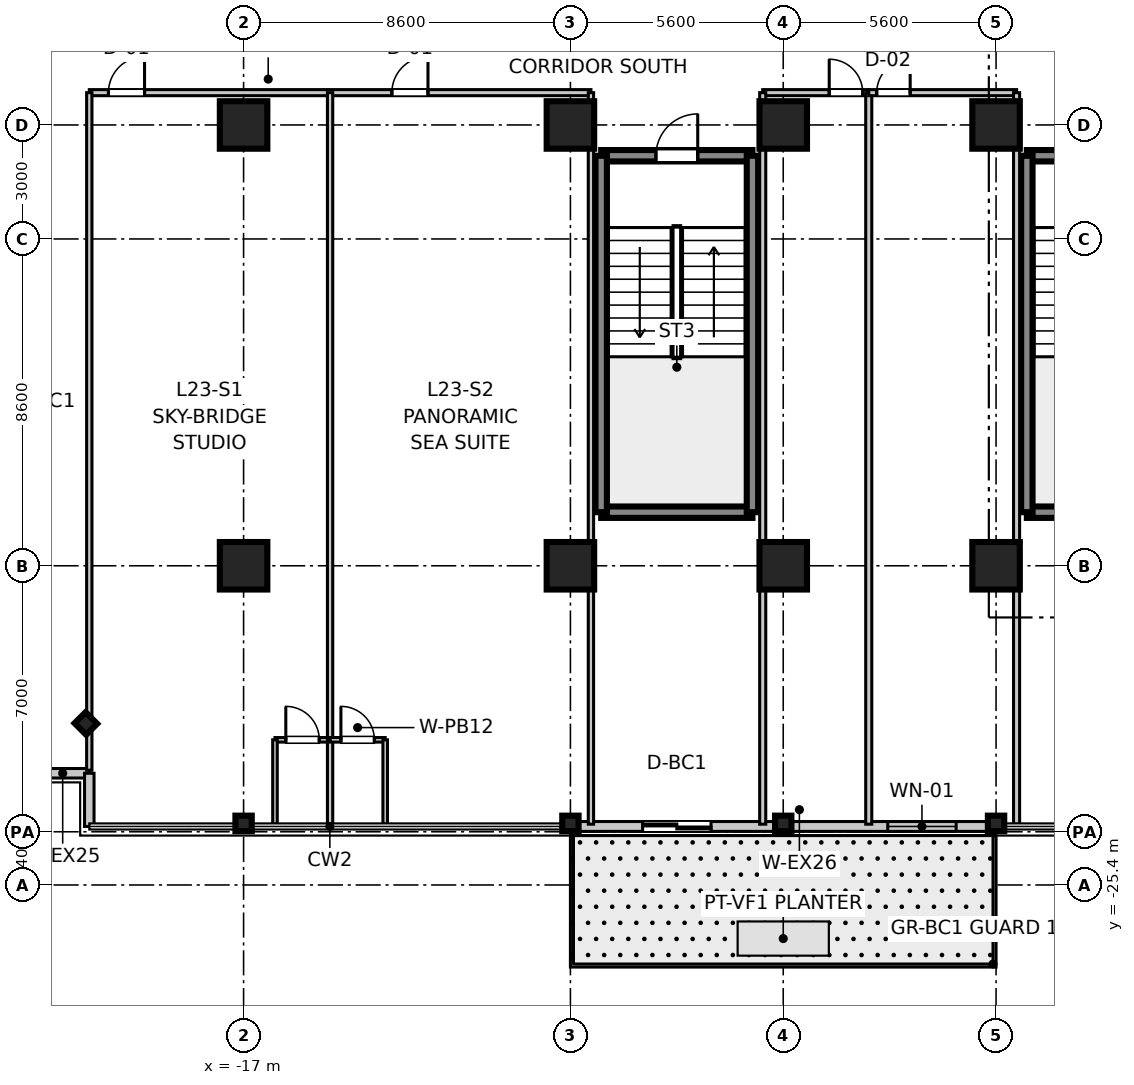
"""IFC4 building model, lengths in metres.
Left out: names, types, materials, properties, quantities, classifications, styles, units other than length and angle.
Written with IfcOpenShell. Run it as: python <this file> out.ifc"""

import sys

from ifc_helpers import new_model, si_unit, direction, frame, frame_2d, origin, origin_2d, place, context, subcontext, project, spatial, rectangle, i_section, extrude, source, transform, mapped, element, fill, save


model = new_model("IFC4")
c1 = context("Model", 3, precision=1e-05, world=origin(), true_north=direction((0.0, 1.0)))
c2 = subcontext(c1, "Body", "Model", "MODEL_VIEW")
j1 = project(units=[si_unit("LENGTHUNIT", "METRE"), si_unit("PLANEANGLEUNIT", "RADIAN")], contexts=[c1])
p1 = place(None, origin())
s1 = spatial("IfcSite", under=j1, at=p1, CompositionType="ELEMENT")
p2 = place(p1, origin())
s2 = spatial("IfcBuilding", under=s1, at=p2, CompositionType="ELEMENT")
p3 = place(p2, frame((0.0, 0.0, 95.6)))
s3 = spatial("IfcBuildingStorey", under=s2, at=p3, CompositionType="ELEMENT", Elevation=95.6)
m1 = source(origin(), c2, "Body", "SweptSolid", [
    extrude(rectangle(XDim=1.25, YDim=1.25, at=origin_2d()), origin(), (0.0, 0.0, 1.0), 3.605),
])
for number, where, z_axis, x_axis in (
    (1, (-17.0, -17.0, 0.0), (0.0, 0.0, 1.0), (1.0, 0.0, 0.0)),
    (2, (-17.0, -5.4, 0.0), (0.0, 0.0, 1.0), (1.0, 0.0, 0.0)),
    (3, (-8.4, -17.0, 0.0), (0.0, 0.0, 1.0), (1.0, 0.0, 0.0)),
    (4, (-8.4, -5.4, 0.0), (0.0, 0.0, 1.0), (1.0, 0.0, 0.0)),
    (5, (-2.8, -17.0, 0.0), (0.0, 0.0, 1.0), (1.0, 0.0, 0.0)),
    (6, (-2.8, -5.4, 0.0), (0.0, 0.0, 1.0), (1.0, 0.0, 0.0)),
    (7, (2.8, -17.0, 0.0), (0.0, 0.0, 1.0), (1.0, 0.0, 0.0)),
    (8, (2.8, -5.4, 0.0), (0.0, 0.0, 1.0), (1.0, 0.0, 0.0)),
):
    element("IfcColumn", number, at=place(p3, frame(where, z_axis=z_axis, x_axis=x_axis)), inside=s3, PredefinedType="COLUMN", context=c2, shape_type="MappedRepresentation", body=[
        mapped(m1, transform((0.0, 0.0, 0.0), scale=1.0)),
    ])
m2 = source(origin(), c2, "Body", "SweptSolid", [
    extrude(i_section(OverallWidth=0.409, OverallDepth=0.43, WebThickness=0.021, FlangeThickness=0.034, at=origin_2d()), origin(), (0.0, 0.0, 1.0), 3.605),
])
for number, where, z_axis, x_axis in (
    (9, (-17.0, -23.78, 0.0), (0.0, 0.0, 1.0), (0.0, 1.0, 0.0)),
    (10, (-8.4, -23.78, 0.0), (0.0, 0.0, 1.0), (0.0, 1.0, 0.0)),
    (11, (-2.8, -23.78, 0.0), (0.0, 0.0, 1.0), (0.0, 1.0, 0.0)),
    (12, (2.8, -23.78, 0.0), (0.0, 0.0, 1.0), (0.0, 1.0, 0.0)),
    (13, (-21.15, -21.15, 0.0), (0.0, 0.0, 1.0), (0.707, 0.707, 0.0)),
):
    element("IfcColumn", number, at=place(p3, frame(where, z_axis=z_axis, x_axis=x_axis)), inside=s3, PredefinedType="COLUMN", context=c2, shape_type="MappedRepresentation", body=[
        mapped(m2, transform((0.0, 0.0, 0.0), scale=1.0)),
    ])
m3 = source(origin(), c2, "Body", "SweptSolid", [
    extrude(rectangle(XDim=3.98, YDim=0.3, at=frame_2d((1.99, 0.0))), origin(), (0.0, 0.0, 1.0), 3.38),
])
for number, where, z_axis, x_axis in (
    (14, (3.61, -15.59, 0.0), (0.0, 0.0, 1.0), (1.0, 0.0, 0.0)),
    (15, (3.61, -6.21, 0.0), (0.0, 0.0, 1.0), (1.0, 0.0, 0.0)),
):
    element("IfcWall", number, at=place(p3, frame(where, z_axis=z_axis, x_axis=x_axis)), inside=s3, PredefinedType="SHEAR", context=c2, shape_type="MappedRepresentation", body=[
        mapped(m3, transform((0.0, 0.0, 0.0), scale=1.0)),
    ])
m4 = source(origin(), c2, "Body", "SweptSolid", [
    extrude(rectangle(XDim=9.38, YDim=0.3, at=frame_2d((4.69, 0.0))), origin(), (0.0, 0.0, 1.0), 3.38),
])
p4 = place(p3, frame((3.61, -15.59, 0.0), z_axis=(0.0, 0.0, 1.0), x_axis=(0.0, 1.0, 0.0)))
e16 = element("IfcWall", 16, at=p4, inside=s3, PredefinedType="SHEAR", context=c2, shape_type="MappedRepresentation", body=[
    mapped(m4, transform((0.0, 0.0, 0.0), scale=1.0)),
])
p5 = place(p3, frame((-7.59, -15.59, 0.0), z_axis=(0.0, 0.0, 1.0), x_axis=(1.0, 0.0, 0.0)))
e17 = element("IfcWall", 17, at=p5, inside=s3, PredefinedType="SHEAR", context=c2, shape_type="MappedRepresentation", body=[
    mapped(m3, transform((0.0, 0.0, 0.0), scale=1.0)),
])
p6 = place(p3, frame((-7.59, -6.21, 0.0), z_axis=(0.0, 0.0, 1.0), x_axis=(1.0, 0.0, 0.0)))
e18 = element("IfcWall", 18, at=p6, inside=s3, PredefinedType="SHEAR", context=c2, shape_type="MappedRepresentation", body=[
    mapped(m3, transform((0.0, 0.0, 0.0), scale=1.0)),
])
p7 = place(p6, frame((1.44, 0.0, 0.0)))
e19 = element("IfcOpeningElement", 19, at=p7, cuts=e18, PredefinedType="OPENING", context=c2, shape_type="SweptSolid", body=[
    extrude(rectangle(XDim=1.1, YDim=2.15, at=frame_2d((0.55, 1.075))), frame((0.0, 0.16, 0.0), z_axis=(0.0, -1.0, 0.0), x_axis=(1.0, 0.0, 0.0)), (0.0, 0.0, 1.0), 0.32),
])
for number, where, z_axis, x_axis in (
    (20, (-7.59, -15.59, 0.0), (0.0, 0.0, 1.0), (0.0, 1.0, 0.0)),
    (21, (-3.61, -15.59, 0.0), (0.0, 0.0, 1.0), (0.0, 1.0, 0.0)),
):
    element("IfcWall", number, at=place(p3, frame(where, z_axis=z_axis, x_axis=x_axis)), inside=s3, PredefinedType="SHEAR", context=c2, shape_type="MappedRepresentation", body=[
        mapped(m4, transform((0.0, 0.0, 0.0), scale=1.0)),
    ])
m5 = source(origin(), c2, "Body", "SweptSolid", [
    extrude(rectangle(XDim=1.4, YDim=0.25, at=frame_2d((0.7, 0.0))), origin(), (0.0, 0.0, 1.0), 3.38),
])
p8 = place(p3, frame((-22.46, -22.46, 0.0), z_axis=(0.0, 0.0, 1.0), x_axis=(1.0, 0.0, 0.0)))
e22 = element("IfcWall", 22, at=p8, inside=s3, PredefinedType="STANDARD", context=c2, shape_type="MappedRepresentation", body=[
    mapped(m5, transform((0.0, 0.0, 0.0), scale=1.0)),
])
m6 = source(origin(), c2, "Body", "SweptSolid", [
    extrude(rectangle(XDim=1.4, YDim=0.25, at=frame_2d((0.7, 0.0))), origin(), (0.0, 0.0, 1.0), 3.38),
])
p9 = place(p3, frame((-21.06, -23.86, 0.0), z_axis=(0.0, 0.0, 1.0), x_axis=(0.0, 1.0, 0.0)))
e23 = element("IfcWall", 23, at=p9, inside=s3, PredefinedType="STANDARD", context=c2, shape_type="MappedRepresentation", body=[
    mapped(m6, transform((0.0, 0.0, 0.0), scale=1.0)),
])
m7 = source(origin(), c2, "Body", "SweptSolid", [
    extrude(rectangle(XDim=11.2, YDim=0.26, at=frame_2d((5.6, 0.0))), origin(), (0.0, 0.0, 1.0), 2.86),
])
p10 = place(p3, frame((-8.4, -23.86, 0.0), z_axis=(0.0, 0.0, 1.0), x_axis=(1.0, 0.0, 0.0)))
e24 = element("IfcWall", 24, at=p10, inside=s3, PredefinedType="STANDARD", context=c2, shape_type="MappedRepresentation", body=[
    mapped(m7, transform((0.0, 0.0, 0.0), scale=1.0)),
])
p11 = place(p10, frame((1.9, 0.0, 0.0)))
e25 = element("IfcOpeningElement", 25, at=p11, cuts=e24, PredefinedType="OPENING", context=c2, shape_type="SweptSolid", body=[
    extrude(rectangle(XDim=1.8, YDim=2.25, at=frame_2d((0.9, 1.125))), frame((0.0, 0.14, 0.0), z_axis=(0.0, -1.0, 0.0), x_axis=(1.0, 0.0, 0.0)), (0.0, 0.0, 1.0), 0.28),
])
p12 = place(p10, frame((8.35, 0.0, 0.85)))
e26 = element("IfcOpeningElement", 26, at=p12, cuts=e24, PredefinedType="OPENING", context=c2, shape_type="SweptSolid", body=[
    extrude(rectangle(XDim=1.8, YDim=1.5, at=frame_2d((0.9, 0.75))), frame((0.0, 0.14, 0.0), z_axis=(0.0, -1.0, 0.0), x_axis=(1.0, 0.0, 0.0)), (0.0, 0.0, 1.0), 0.28),
])
m8 = source(origin(), c2, "Body", "SweptSolid", [
    extrude(rectangle(XDim=13.2, YDim=0.16, at=frame_2d((6.6, 0.0))), origin(), (0.0, 0.0, 1.0), 2.72),
])
p13 = place(p3, frame((-21.06, -4.55, 0.0), z_axis=(0.0, 0.0, 1.0), x_axis=(1.0, 0.0, 0.0)))
e27 = element("IfcWall", 27, at=p13, inside=s3, PredefinedType="PARTITIONING", context=c2, shape_type="MappedRepresentation", body=[
    mapped(m8, transform((0.0, 0.0, 0.0), scale=1.0)),
])
p14 = place(p13, frame((0.504, 0.0, 0.0)))
e28 = element("IfcOpeningElement", 28, at=p14, cuts=e27, PredefinedType="OPENING", context=c2, shape_type="SweptSolid", body=[
    extrude(rectangle(XDim=0.95, YDim=2.1, at=frame_2d((0.475, 1.05))), frame((0.0, 0.09, 0.0), z_axis=(0.0, -1.0, 0.0), x_axis=(1.0, 0.0, 0.0)), (0.0, 0.0, 1.0), 0.18),
])
p15 = place(p13, frame((7.962, 0.0, 0.0)))
e29 = element("IfcOpeningElement", 29, at=p15, cuts=e27, PredefinedType="OPENING", context=c2, shape_type="SweptSolid", body=[
    extrude(rectangle(XDim=0.95, YDim=2.1, at=frame_2d((0.475, 1.05))), frame((0.0, 0.09, 0.0), z_axis=(0.0, -1.0, 0.0), x_axis=(1.0, 0.0, 0.0)), (0.0, 0.0, 1.0), 0.18),
])
m9 = source(origin(), c2, "Body", "SweptSolid", [
    extrude(rectangle(XDim=17.83, YDim=0.14, at=frame_2d((8.915, 0.0))), origin(), (0.0, 0.0, 1.0), 2.72),
])
p16 = place(p3, frame((-21.06, -22.38, 0.0), z_axis=(0.0, 0.0, 1.0), x_axis=(0.0, 1.0, 0.0)))
e30 = element("IfcWall", 30, at=p16, inside=s3, PredefinedType="PARTITIONING", context=c2, shape_type="MappedRepresentation", body=[
    mapped(m9, transform((0.0, 0.0, 0.0), scale=1.0)),
])
m10 = source(origin(), c2, "Body", "SweptSolid", [
    extrude(rectangle(XDim=19.25, YDim=0.14, at=frame_2d((9.625, 0.0))), origin(), (0.0, 0.0, 1.0), 2.72),
])
p17 = place(p3, frame((-7.86, -23.8, 0.0), z_axis=(0.0, 0.0, 1.0), x_axis=(0.0, 1.0, 0.0)))
e31 = element("IfcWall", 31, at=p17, inside=s3, PredefinedType="PARTITIONING", context=c2, shape_type="MappedRepresentation", body=[
    mapped(m10, transform((0.0, 0.0, 0.0), scale=1.0)),
])
m11 = source(origin(), c2, "Body", "SweptSolid", [
    extrude(rectangle(XDim=1.45, YDim=0.12, at=frame_2d((0.725, 0.0))), origin(), (0.0, 0.0, 1.0), 2.72),
])
p18 = place(p3, frame((-16.174, -21.58, 0.0), z_axis=(0.0, 0.0, 1.0), x_axis=(1.0, 0.0, 0.0)))
e32 = element("IfcWall", 32, at=p18, inside=s3, PredefinedType="PARTITIONING", context=c2, shape_type="MappedRepresentation", body=[
    mapped(m11, transform((0.0, 0.0, 0.0), scale=1.0)),
])
p19 = place(p18, frame((0.285, 0.0, 0.0)))
e33 = element("IfcOpeningElement", 33, at=p19, cuts=e32, PredefinedType="OPENING", context=c2, shape_type="SweptSolid", body=[
    extrude(rectangle(XDim=0.88, YDim=2.1, at=frame_2d((0.44, 1.05))), frame((0.0, 0.07, 0.0), z_axis=(0.0, -1.0, 0.0), x_axis=(1.0, 0.0, 0.0)), (0.0, 0.0, 1.0), 0.14),
])
m12 = source(origin(), c2, "Body", "SweptSolid", [
    extrude(rectangle(XDim=2.22, YDim=0.12, at=frame_2d((1.11, 0.0))), origin(), (0.0, 0.0, 1.0), 2.72),
])
p20 = place(p3, frame((-16.174, -23.8, 0.0), z_axis=(0.0, 0.0, 1.0), x_axis=(0.0, 1.0, 0.0)))
e34 = element("IfcWall", 34, at=p20, inside=s3, PredefinedType="PARTITIONING", context=c2, shape_type="MappedRepresentation", body=[
    mapped(m12, transform((0.0, 0.0, 0.0), scale=1.0)),
])
p21 = place(p3, frame((-14.724, -23.8, 0.0), z_axis=(0.0, 0.0, 1.0), x_axis=(0.0, 1.0, 0.0)))
e35 = element("IfcWall", 35, at=p21, inside=s3, PredefinedType="PARTITIONING", context=c2, shape_type="MappedRepresentation", body=[
    mapped(m10, transform((0.0, 0.0, 0.0), scale=1.0)),
])
m13 = source(origin(), c2, "Body", "SweptSolid", [
    extrude(rectangle(XDim=1.45, YDim=0.12, at=frame_2d((0.725, 0.0))), origin(), (0.0, 0.0, 1.0), 2.72),
])
p22 = place(p3, frame((-14.724, -21.58, 0.0), z_axis=(0.0, 0.0, 1.0), x_axis=(1.0, 0.0, 0.0)))
e36 = element("IfcWall", 36, at=p22, inside=s3, PredefinedType="PARTITIONING", context=c2, shape_type="MappedRepresentation", body=[
    mapped(m13, transform((0.0, 0.0, 0.0), scale=1.0)),
])
p23 = place(p22, frame((0.285, 0.0, 0.0)))
e37 = element("IfcOpeningElement", 37, at=p23, cuts=e36, PredefinedType="OPENING", context=c2, shape_type="SweptSolid", body=[
    extrude(rectangle(XDim=0.88, YDim=2.1, at=frame_2d((0.44, 1.05))), frame((0.0, 0.07, 0.0), z_axis=(0.0, -1.0, 0.0), x_axis=(1.0, 0.0, 0.0)), (0.0, 0.0, 1.0), 0.14),
])
p24 = place(p3, frame((-13.274, -23.8, 0.0), z_axis=(0.0, 0.0, 1.0), x_axis=(0.0, 1.0, 0.0)))
e38 = element("IfcWall", 38, at=p24, inside=s3, PredefinedType="PARTITIONING", context=c2, shape_type="MappedRepresentation", body=[
    mapped(m12, transform((0.0, 0.0, 0.0), scale=1.0)),
])
m14 = source(origin(), c2, "Body", "SweptSolid", [
    extrude(rectangle(XDim=2.79, YDim=0.16, at=frame_2d((1.395, 0.0))), origin(), (0.0, 0.0, 1.0), 2.72),
])
p25 = place(p3, frame((-3.34, -4.55, 0.0), z_axis=(0.0, 0.0, 1.0), x_axis=(1.0, 0.0, 0.0)))
e39 = element("IfcWall", 39, at=p25, inside=s3, PredefinedType="PARTITIONING", context=c2, shape_type="MappedRepresentation", body=[
    mapped(m14, transform((0.0, 0.0, 0.0), scale=1.0)),
])
p26 = place(p25, frame((1.75, 0.0, 0.0)))
e40 = element("IfcOpeningElement", 40, at=p26, cuts=e39, PredefinedType="OPENING", context=c2, shape_type="SweptSolid", body=[
    extrude(rectangle(XDim=0.88, YDim=2.1, at=frame_2d((0.44, 1.05))), frame((0.0, 0.09, 0.0), z_axis=(0.0, -1.0, 0.0), x_axis=(1.0, 0.0, 0.0)), (0.0, 0.0, 1.0), 0.18),
])
m15 = source(origin(), c2, "Body", "SweptSolid", [
    extrude(rectangle(XDim=19.25, YDim=0.16, at=frame_2d((9.625, 0.0))), origin(), (0.0, 0.0, 1.0), 2.72),
])
for number, where, z_axis, x_axis in (
    (41, (-3.34, -23.8, 0.0), (0.0, 0.0, 1.0), (0.0, 1.0, 0.0)),
    (42, (-0.55, -23.8, 0.0), (0.0, 0.0, 1.0), (0.0, 1.0, 0.0)),
):
    element("IfcWall", number, at=place(p3, frame(where, z_axis=z_axis, x_axis=x_axis)), inside=s3, PredefinedType="PARTITIONING", context=c2, shape_type="MappedRepresentation", body=[
        mapped(m15, transform((0.0, 0.0, 0.0), scale=1.0)),
    ])
m16 = source(origin(), c2, "Body", "SweptSolid", [
    extrude(rectangle(XDim=3.89, YDim=0.16, at=frame_2d((1.945, 0.0))), origin(), (0.0, 0.0, 1.0), 2.72),
])
p27 = place(p3, frame((-0.55, -4.55, 0.0), z_axis=(0.0, 0.0, 1.0), x_axis=(1.0, 0.0, 0.0)))
e43 = element("IfcWall", 43, at=p27, inside=s3, PredefinedType="PARTITIONING", context=c2, shape_type="MappedRepresentation", body=[
    mapped(m16, transform((0.0, 0.0, 0.0), scale=1.0)),
])
p28 = place(p27, frame((0.21, 0.0, 0.0)))
e44 = element("IfcOpeningElement", 44, at=p28, cuts=e43, PredefinedType="OPENING", context=c2, shape_type="SweptSolid", body=[
    extrude(rectangle(XDim=0.88, YDim=2.1, at=frame_2d((0.44, 1.05))), frame((0.0, 0.09, 0.0), z_axis=(0.0, -1.0, 0.0), x_axis=(1.0, 0.0, 0.0)), (0.0, 0.0, 1.0), 0.18),
])
p29 = place(p3, frame((3.34, -23.8, 0.0), z_axis=(0.0, 0.0, 1.0), x_axis=(0.0, 1.0, 0.0)))
e45 = element("IfcWall", 45, at=p29, inside=s3, PredefinedType="PARTITIONING", context=c2, shape_type="MappedRepresentation", body=[
    mapped(m15, transform((0.0, 0.0, 0.0), scale=1.0)),
])
m17 = source(origin(), c2, "Body", "SweptSolid", [
    extrude(rectangle(XDim=1.1, YDim=2.15, at=frame_2d((0.55, 1.075))), frame((0.0, 0.025, 0.0), z_axis=(0.0, -1.0, 0.0), x_axis=(1.0, 0.0, 0.0)), (0.0, 0.0, 1.0), 0.05),
])
p30 = place(p7, frame((1.1, 0.0, 0.0), z_axis=(0.0, 0.0, 1.0), x_axis=(-1.0, 0.0, 0.0)))
e46 = element("IfcDoor", 46, at=p30, inside=s3, OperationType="SINGLE_SWING_RIGHT", PredefinedType="DOOR", context=c2, shape_type="MappedRepresentation", body=[
    mapped(m17, transform((0.0, 0.0, 0.0), scale=1.0)),
])
fill(e19, e46)
m18 = source(origin(), c2, "Body", "SweptSolid", [
    extrude(rectangle(XDim=0.88, YDim=2.1, at=frame_2d((0.44, 1.05))), frame((0.0, 0.025, 0.0), z_axis=(0.0, -1.0, 0.0), x_axis=(1.0, 0.0, 0.0)), (0.0, 0.0, 1.0), 0.05),
])
p31 = place(p19, frame((0.88, 0.0, 0.0), z_axis=(0.0, 0.0, 1.0), x_axis=(-1.0, 0.0, 0.0)))
e47 = element("IfcDoor", 47, at=p31, inside=s3, OperationType="SINGLE_SWING_LEFT", PredefinedType="DOOR", context=c2, shape_type="MappedRepresentation", body=[
    mapped(m18, transform((0.0, 0.0, 0.0), scale=1.0)),
])
fill(e33, e47)
m19 = source(origin(), c2, "Body", "SweptSolid", [
    extrude(rectangle(XDim=0.95, YDim=2.1, at=frame_2d((0.475, 1.05))), frame((0.0, 0.025, 0.0), z_axis=(0.0, -1.0, 0.0), x_axis=(1.0, 0.0, 0.0)), (0.0, 0.0, 1.0), 0.05),
])
p32 = place(p14, frame((0.95, 0.0, 0.0), z_axis=(0.0, 0.0, 1.0), x_axis=(-1.0, 0.0, 0.0)))
e48 = element("IfcDoor", 48, at=p32, inside=s3, OperationType="SINGLE_SWING_RIGHT", PredefinedType="DOOR", context=c2, shape_type="MappedRepresentation", body=[
    mapped(m19, transform((0.0, 0.0, 0.0), scale=1.0)),
])
fill(e28, e48)
p33 = place(p23, frame((0.88, 0.0, 0.0), z_axis=(0.0, 0.0, 1.0), x_axis=(-1.0, 0.0, 0.0)))
e49 = element("IfcDoor", 49, at=p33, inside=s3, OperationType="SINGLE_SWING_LEFT", PredefinedType="DOOR", context=c2, shape_type="MappedRepresentation", body=[
    mapped(m18, transform((0.0, 0.0, 0.0), scale=1.0)),
])
fill(e37, e49)
p34 = place(p15, frame((0.95, 0.0, 0.0), z_axis=(0.0, 0.0, 1.0), x_axis=(-1.0, 0.0, 0.0)))
e50 = element("IfcDoor", 50, at=p34, inside=s3, OperationType="SINGLE_SWING_RIGHT", PredefinedType="DOOR", context=c2, shape_type="MappedRepresentation", body=[
    mapped(m19, transform((0.0, 0.0, 0.0), scale=1.0)),
])
fill(e29, e50)
p35 = place(p26, frame((0.88, 0.0, 0.0), z_axis=(0.0, 0.0, 1.0), x_axis=(-1.0, 0.0, 0.0)))
e51 = element("IfcDoor", 51, at=p35, inside=s3, OperationType="SINGLE_SWING_LEFT", PredefinedType="DOOR", context=c2, shape_type="MappedRepresentation", body=[
    mapped(m18, transform((0.0, 0.0, 0.0), scale=1.0)),
])
fill(e40, e51)
p36 = place(p28, frame((0.88, 0.0, 0.0), z_axis=(0.0, 0.0, 1.0), x_axis=(-1.0, 0.0, 0.0)))
e52 = element("IfcDoor", 52, at=p36, inside=s3, OperationType="SINGLE_SWING_RIGHT", PredefinedType="DOOR", context=c2, shape_type="MappedRepresentation", body=[
    mapped(m18, transform((0.0, 0.0, 0.0), scale=1.0)),
])
fill(e44, e52)
m20 = source(origin(), c2, "Body", "SweptSolid", [
    extrude(rectangle(XDim=1.8, YDim=2.25, at=frame_2d((0.9, 1.125))), frame((0.0, 0.025, 0.0), z_axis=(0.0, -1.0, 0.0), x_axis=(1.0, 0.0, 0.0)), (0.0, 0.0, 1.0), 0.05),
])
p37 = place(p11, frame((1.8, 0.0, 0.0), z_axis=(0.0, 0.0, 1.0), x_axis=(-1.0, 0.0, 0.0)))
e53 = element("IfcDoor", 53, at=p37, inside=s3, OperationType="DOUBLE_DOOR_SLIDING", PredefinedType="DOOR", context=c2, shape_type="MappedRepresentation", body=[
    mapped(m20, transform((0.0, 0.0, 0.0), scale=1.0)),
])
fill(e25, e53)
m21 = source(origin(), c2, "Body", "SweptSolid", [
    extrude(rectangle(XDim=1.8, YDim=1.5, at=frame_2d((0.9, 0.75))), frame((0.0, 0.03, 0.0), z_axis=(0.0, -1.0, 0.0), x_axis=(1.0, 0.0, 0.0)), (0.0, 0.0, 1.0), 0.06),
])
p38 = place(p12, origin())
e54 = element("IfcWindow", 54, at=p38, inside=s3, PartitioningType="SINGLE_PANEL", PredefinedType="WINDOW", context=c2, shape_type="MappedRepresentation", body=[
    mapped(m21, transform((0.0, 0.0, 0.0), scale=1.0)),
])
fill(e26, e54)
save(model, sys.argv[1])
